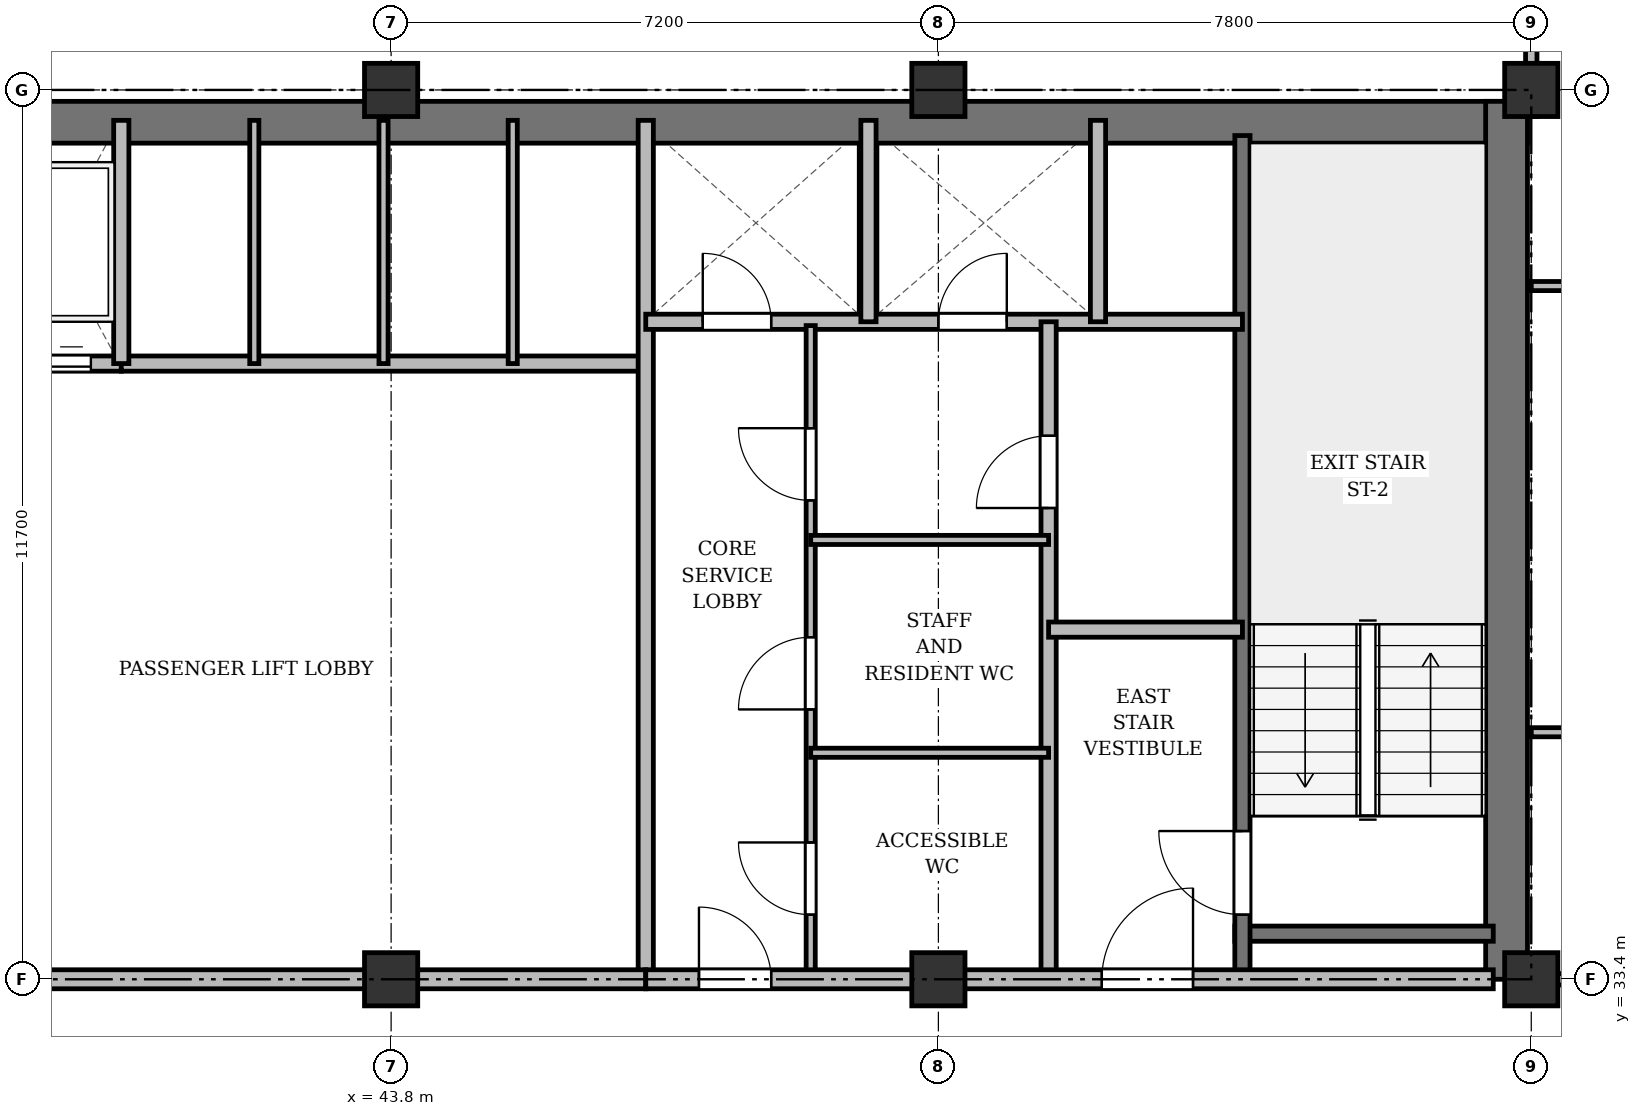
"""IFC4 building model, lengths in metres.
Left out: names, types, materials, properties, quantities, classifications, styles, units other than length and angle.
Written with IfcOpenShell. Run it as: python <this file> out.ifc"""

import sys

from ifc_helpers import new_model, si_unit, direction, frame, frame_2d, origin, origin_2d, place, context, subcontext, project, spatial, rectangle, extrude, source, transform, mapped, element, fill, save


model = new_model("IFC4")
c1 = context("Model", 3, precision=1e-05, world=origin(), true_north=direction((0.0, 1.0)))
c2 = subcontext(c1, "Body", "Model", "MODEL_VIEW")
j1 = project(units=[si_unit("LENGTHUNIT", "METRE"), si_unit("PLANEANGLEUNIT", "RADIAN")], contexts=[c1])
p1 = place(None, origin())
s1 = spatial("IfcSite", under=j1, at=p1, CompositionType="ELEMENT")
p2 = place(p1, origin())
s2 = spatial("IfcBuilding", under=s1, at=p2, CompositionType="ELEMENT")
p3 = place(p2, frame((0.0, 0.0, 153.7)))
s3 = spatial("IfcBuildingStorey", under=s2, at=p3, CompositionType="ELEMENT", Elevation=153.7)
m1 = source(origin(), c2, "Body", "SweptSolid", [
    extrude(rectangle(XDim=0.7, YDim=0.7, at=origin_2d()), origin(), (0.0, 0.0, 1.0), 3.6),
])
for number, where, z_axis, x_axis in (
    (1, (43.8, 33.4, 0.0), (0.0, 0.0, 1.0), (1.0, 0.0, 0.0)),
    (2, (43.8, 45.1, 0.0), (0.0, 0.0, 1.0), (1.0, 0.0, 0.0)),
    (3, (51.0, 33.4, 0.0), (0.0, 0.0, 1.0), (1.0, 0.0, 0.0)),
    (4, (51.0, 45.1, 0.0), (0.0, 0.0, 1.0), (1.0, 0.0, 0.0)),
    (5, (58.8, 33.4, 0.0), (0.0, 0.0, 1.0), (1.0, 0.0, 0.0)),
    (6, (58.8, 45.1, 0.0), (0.0, 0.0, 1.0), (1.0, 0.0, 0.0)),
):
    element("IfcColumn", number, at=place(p3, frame(where, z_axis=z_axis, x_axis=x_axis)), inside=s3, PredefinedType="COLUMN", context=c2, shape_type="MappedRepresentation", body=[
        mapped(m1, transform((0.0, 0.0, 0.0), x_axis=(1.0, 0.0, 0.0), y_axis=(0.0, 1.0, 0.0), z_axis=(0.0, 0.0, 1.0), scale=1.0)),
    ])
p4 = place(p3, frame((15.65, 44.675, 0.0), z_axis=(0.0, 0.0, 1.0), x_axis=(1.0, 0.0, 0.0)))
e7 = element("IfcWall", 7, at=p4, inside=s3, PredefinedType="SHEAR", context=c2, shape_type="SweptSolid", body=[
    extrude(rectangle(XDim=43.1, YDim=0.55, at=frame_2d((21.55, 0.0))), origin(), (0.0, 0.0, 1.0), 3.35),
])
p5 = place(p3, frame((58.475, 33.4, 0.0), z_axis=(0.0, 0.0, 1.0), x_axis=(0.0, 1.0, 0.0)))
e8 = element("IfcWall", 8, at=p5, inside=s3, PredefinedType="SHEAR", context=c2, shape_type="SweptSolid", body=[
    extrude(rectangle(XDim=11.55, YDim=0.55, at=frame_2d((5.775, 0.0))), origin(), (0.0, 0.0, 1.0), 3.35),
])
p6 = place(p3, frame((54.9, 34.0, 0.0), z_axis=(0.0, 0.0, 1.0), x_axis=(1.0, 0.0, 0.0)))
e9 = element("IfcWall", 9, at=p6, inside=s3, PredefinedType="SHEAR", context=c2, shape_type="SweptSolid", body=[
    extrude(rectangle(XDim=3.4, YDim=0.2, at=frame_2d((1.7, 0.0))), origin(), (0.0, 0.0, 1.0), 3.35),
])
p7 = place(p3, frame((55.0, 33.4, 0.0), z_axis=(0.0, 0.0, 1.0), x_axis=(0.0, 1.0, 0.0)))
e10 = element("IfcWall", 10, at=p7, inside=s3, PredefinedType="SHEAR", context=c2, shape_type="SweptSolid", body=[
    extrude(rectangle(XDim=11.1, YDim=0.2, at=frame_2d((5.55, 0.0))), origin(), (0.0, 0.0, 1.0), 3.35),
])
p8 = place(p7, frame((0.85, 0.0, 0.0)))
e11 = element("IfcOpeningElement", 11, at=p8, cuts=e10, PredefinedType="OPENING", context=c2, shape_type="SweptSolid", body=[
    extrude(rectangle(XDim=1.1, YDim=2.15, at=frame_2d((0.55, 1.075))), frame((0.0, 0.11, 0.0), z_axis=(0.0, -1.0, 0.0), x_axis=(1.0, 0.0, 0.0)), (0.0, 0.0, 1.0), 0.22),
])
p9 = place(p3, frame((33.35, 41.5, 0.0), z_axis=(0.0, 0.0, 1.0), x_axis=(1.0, 0.0, 0.0)))
e12 = element("IfcWall", 12, at=p9, inside=s3, PredefinedType="SOLIDWALL", context=c2, shape_type="SweptSolid", body=[
    extrude(rectangle(XDim=6.9, YDim=0.2, at=frame_2d((3.45, 0.0))), origin(), (0.0, 0.0, 1.0), 3.35),
])
p10 = place(p9, frame((0.35, 0.0, 0.0)))
e13 = element("IfcOpeningElement", 13, at=p10, cuts=e12, PredefinedType="OPENING", context=c2, shape_type="SweptSolid", body=[
    extrude(rectangle(XDim=1.05, YDim=2.15, at=frame_2d((0.525, 1.075))), frame((0.0, 0.11, 0.0), z_axis=(0.0, -1.0, 0.0), x_axis=(1.0, 0.0, 0.0)), (0.0, 0.0, 1.0), 0.22),
])
p11 = place(p9, frame((2.05, 0.0, 0.0)))
e14 = element("IfcOpeningElement", 14, at=p11, cuts=e12, PredefinedType="OPENING", context=c2, shape_type="SweptSolid", body=[
    extrude(rectangle(XDim=1.05, YDim=2.15, at=frame_2d((0.525, 1.075))), frame((0.0, 0.11, 0.0), z_axis=(0.0, -1.0, 0.0), x_axis=(1.0, 0.0, 0.0)), (0.0, 0.0, 1.0), 0.22),
])
p12 = place(p9, frame((3.75, 0.0, 0.0)))
e15 = element("IfcOpeningElement", 15, at=p12, cuts=e12, PredefinedType="OPENING", context=c2, shape_type="SweptSolid", body=[
    extrude(rectangle(XDim=1.05, YDim=2.15, at=frame_2d((0.525, 1.075))), frame((0.0, 0.11, 0.0), z_axis=(0.0, -1.0, 0.0), x_axis=(1.0, 0.0, 0.0)), (0.0, 0.0, 1.0), 0.22),
])
p13 = place(p9, frame((5.45, 0.0, 0.0)))
e16 = element("IfcOpeningElement", 16, at=p13, cuts=e12, PredefinedType="OPENING", context=c2, shape_type="SweptSolid", body=[
    extrude(rectangle(XDim=1.05, YDim=2.15, at=frame_2d((0.525, 1.075))), frame((0.0, 0.11, 0.0), z_axis=(0.0, -1.0, 0.0), x_axis=(1.0, 0.0, 0.0)), (0.0, 0.0, 1.0), 0.22),
])
p14 = place(p3, frame((40.25, 41.5, 0.0), z_axis=(0.0, 0.0, 1.0), x_axis=(1.0, 0.0, 0.0)))
e17 = element("IfcWall", 17, at=p14, inside=s3, PredefinedType="SOLIDWALL", context=c2, shape_type="SweptSolid", body=[
    extrude(rectangle(XDim=6.9, YDim=0.2, at=frame_2d((3.45, 0.0))), origin(), (0.0, 0.0, 1.0), 2.85),
])
p15 = place(p3, frame((40.25, 41.5, 0.0), z_axis=(0.0, 0.0, 1.0), x_axis=(0.0, 1.0, 0.0)))
e18 = element("IfcWall", 18, at=p15, inside=s3, PredefinedType="SOLIDWALL", context=c2, shape_type="SweptSolid", body=[
    extrude(rectangle(XDim=3.2, YDim=0.2, at=frame_2d((1.6, 0.0))), origin(), (0.0, 0.0, 1.0), 3.35),
])
p16 = place(p3, frame((42.0, 41.5, 0.0), z_axis=(0.0, 0.0, 1.0), x_axis=(0.0, 1.0, 0.0)))
e19 = element("IfcWall", 19, at=p16, inside=s3, PredefinedType="PARTITIONING", context=c2, shape_type="SweptSolid", body=[
    extrude(rectangle(XDim=3.2, YDim=0.12, at=frame_2d((1.6, 0.0))), origin(), (0.0, 0.0, 1.0), 3.35),
])
p17 = place(p3, frame((43.7, 41.5, 0.0), z_axis=(0.0, 0.0, 1.0), x_axis=(0.0, 1.0, 0.0)))
e20 = element("IfcWall", 20, at=p17, inside=s3, PredefinedType="PARTITIONING", context=c2, shape_type="SweptSolid", body=[
    extrude(rectangle(XDim=3.2, YDim=0.12, at=frame_2d((1.6, 0.0))), origin(), (0.0, 0.0, 1.0), 2.85),
])
p18 = place(p3, frame((45.4, 41.5, 0.0), z_axis=(0.0, 0.0, 1.0), x_axis=(0.0, 1.0, 0.0)))
e21 = element("IfcWall", 21, at=p18, inside=s3, PredefinedType="PARTITIONING", context=c2, shape_type="SweptSolid", body=[
    extrude(rectangle(XDim=3.2, YDim=0.12, at=frame_2d((1.6, 0.0))), origin(), (0.0, 0.0, 1.0), 3.35),
])
p19 = place(p3, frame((47.15, 33.4, 0.0), z_axis=(0.0, 0.0, 1.0), x_axis=(0.0, 1.0, 0.0)))
e22 = element("IfcWall", 22, at=p19, inside=s3, PredefinedType="SOLIDWALL", context=c2, shape_type="SweptSolid", body=[
    extrude(rectangle(XDim=11.3, YDim=0.2, at=frame_2d((5.65, 0.0))), origin(), (0.0, 0.0, 1.0), 2.75),
])
p20 = place(p3, frame((33.3, 33.4, 0.0), z_axis=(0.0, 0.0, 1.0), x_axis=(1.0, 0.0, 0.0)))
e23 = element("IfcWall", 23, at=p20, inside=s3, PredefinedType="PARTITIONING", context=c2, shape_type="SweptSolid", body=[
    extrude(rectangle(XDim=13.85, YDim=0.25, at=frame_2d((6.925, 0.0))), origin(), (0.0, 0.0, 1.0), 2.75),
])
p21 = place(p20, frame((4.2, 0.0, 0.0)))
e24 = element("IfcOpeningElement", 24, at=p21, cuts=e23, PredefinedType="OPENING", context=c2, shape_type="SweptSolid", body=[
    extrude(rectangle(XDim=1.6, YDim=2.2, at=frame_2d((0.8, 1.1))), frame((0.0, 0.135, 0.0), z_axis=(0.0, -1.0, 0.0), x_axis=(1.0, 0.0, 0.0)), (0.0, 0.0, 1.0), 0.27),
])
p22 = place(p3, frame((47.15, 42.05, 0.0), z_axis=(0.0, 0.0, 1.0), x_axis=(1.0, 0.0, 0.0)))
e25 = element("IfcWall", 25, at=p22, inside=s3, PredefinedType="SOLIDWALL", context=c2, shape_type="SweptSolid", body=[
    extrude(rectangle(XDim=7.85, YDim=0.2, at=frame_2d((3.925, 0.0))), origin(), (0.0, 0.0, 1.0), 2.85),
])
p23 = place(p22, frame((0.75, 0.0, 0.0)))
e26 = element("IfcOpeningElement", 26, at=p23, cuts=e25, PredefinedType="OPENING", context=c2, shape_type="SweptSolid", body=[
    extrude(rectangle(XDim=0.9, YDim=2.1, at=frame_2d((0.45, 1.05))), frame((0.0, 0.11, 0.0), z_axis=(0.0, -1.0, 0.0), x_axis=(1.0, 0.0, 0.0)), (0.0, 0.0, 1.0), 0.22),
])
p24 = place(p22, frame((3.85, 0.0, 0.0)))
e27 = element("IfcOpeningElement", 27, at=p24, cuts=e25, PredefinedType="OPENING", context=c2, shape_type="SweptSolid", body=[
    extrude(rectangle(XDim=0.9, YDim=2.1, at=frame_2d((0.45, 1.05))), frame((0.0, 0.11, 0.0), z_axis=(0.0, -1.0, 0.0), x_axis=(1.0, 0.0, 0.0)), (0.0, 0.0, 1.0), 0.22),
])
for number, where, z_axis, x_axis in (
    (28, (50.08, 42.05, 0.0), (0.0, 0.0, 1.0), (0.0, 1.0, 0.0)),
    (29, (53.1, 42.05, 0.0), (0.0, 0.0, 1.0), (0.0, 1.0, 0.0)),
):
    element("IfcWall", number, at=place(p3, frame(where, z_axis=z_axis, x_axis=x_axis)), inside=s3, PredefinedType="SOLIDWALL", context=c2, shape_type="SweptSolid", body=[
        extrude(rectangle(XDim=2.65, YDim=0.2, at=frame_2d((1.325, 0.0))), origin(), (0.0, 0.0, 1.0), 3.35),
    ])
p25 = place(p3, frame((52.45, 33.4, 0.0), z_axis=(0.0, 0.0, 1.0), x_axis=(0.0, 1.0, 0.0)))
e30 = element("IfcWall", 30, at=p25, inside=s3, PredefinedType="PARTITIONING", context=c2, shape_type="SweptSolid", body=[
    extrude(rectangle(XDim=8.65, YDim=0.2, at=frame_2d((4.325, 0.0))), origin(), (0.0, 0.0, 1.0), 2.75),
])
p26 = place(p25, frame((6.2, 0.0, 0.0)))
e31 = element("IfcOpeningElement", 31, at=p26, cuts=e30, PredefinedType="OPENING", context=c2, shape_type="SweptSolid", body=[
    extrude(rectangle(XDim=0.95, YDim=2.15, at=frame_2d((0.475, 1.075))), frame((0.0, 0.11, 0.0), z_axis=(0.0, -1.0, 0.0), x_axis=(1.0, 0.0, 0.0)), (0.0, 0.0, 1.0), 0.22),
])
p27 = place(p3, frame((52.45, 38.0, 0.0), z_axis=(0.0, 0.0, 1.0), x_axis=(1.0, 0.0, 0.0)))
e32 = element("IfcWall", 32, at=p27, inside=s3, PredefinedType="PARTITIONING", context=c2, shape_type="SweptSolid", body=[
    extrude(rectangle(XDim=2.55, YDim=0.2, at=frame_2d((1.275, 0.0))), origin(), (0.0, 0.0, 1.0), 3.35),
])
p28 = place(p3, frame((49.32, 33.4, 0.0), z_axis=(0.0, 0.0, 1.0), x_axis=(0.0, 1.0, 0.0)))
e33 = element("IfcWall", 33, at=p28, inside=s3, PredefinedType="PARTITIONING", context=c2, shape_type="SweptSolid", body=[
    extrude(rectangle(XDim=8.6, YDim=0.12, at=frame_2d((4.3, 0.0))), origin(), (0.0, 0.0, 1.0), 2.75),
])
p29 = place(p28, frame((0.85, 0.0, 0.0)))
e34 = element("IfcOpeningElement", 34, at=p29, cuts=e33, PredefinedType="OPENING", context=c2, shape_type="SweptSolid", body=[
    extrude(rectangle(XDim=0.95, YDim=2.15, at=frame_2d((0.475, 1.075))), frame((0.0, 0.07, 0.0), z_axis=(0.0, -1.0, 0.0), x_axis=(1.0, 0.0, 0.0)), (0.0, 0.0, 1.0), 0.14),
])
p30 = place(p28, frame((3.55, 0.0, 0.0)))
e35 = element("IfcOpeningElement", 35, at=p30, cuts=e33, PredefinedType="OPENING", context=c2, shape_type="SweptSolid", body=[
    extrude(rectangle(XDim=0.95, YDim=2.15, at=frame_2d((0.475, 1.075))), frame((0.0, 0.07, 0.0), z_axis=(0.0, -1.0, 0.0), x_axis=(1.0, 0.0, 0.0)), (0.0, 0.0, 1.0), 0.14),
])
p31 = place(p28, frame((6.3, 0.0, 0.0)))
e36 = element("IfcOpeningElement", 36, at=p31, cuts=e33, PredefinedType="OPENING", context=c2, shape_type="SweptSolid", body=[
    extrude(rectangle(XDim=0.95, YDim=2.15, at=frame_2d((0.475, 1.075))), frame((0.0, 0.07, 0.0), z_axis=(0.0, -1.0, 0.0), x_axis=(1.0, 0.0, 0.0)), (0.0, 0.0, 1.0), 0.14),
])
for number, where, z_axis, x_axis in (
    (37, (49.32, 36.38, 0.0), (0.0, 0.0, 1.0), (1.0, 0.0, 0.0)),
    (38, (49.32, 39.18, 0.0), (0.0, 0.0, 1.0), (1.0, 0.0, 0.0)),
):
    element("IfcWall", number, at=place(p3, frame(where, z_axis=z_axis, x_axis=x_axis)), inside=s3, PredefinedType="PARTITIONING", context=c2, shape_type="SweptSolid", body=[
        extrude(rectangle(XDim=3.13, YDim=0.12, at=frame_2d((1.565, 0.0))), origin(), (0.0, 0.0, 1.0), 2.85),
    ])
p32 = place(p3, frame((47.15, 33.4, 0.0), z_axis=(0.0, 0.0, 1.0), x_axis=(1.0, 0.0, 0.0)))
e39 = element("IfcWall", 39, at=p32, inside=s3, PredefinedType="PARTITIONING", context=c2, shape_type="SweptSolid", body=[
    extrude(rectangle(XDim=11.15, YDim=0.25, at=frame_2d((5.575, 0.0))), origin(), (0.0, 0.0, 1.0), 2.75),
])
p33 = place(p32, frame((0.7, 0.0, 0.0)))
e40 = element("IfcOpeningElement", 40, at=p33, cuts=e39, PredefinedType="OPENING", context=c2, shape_type="SweptSolid", body=[
    extrude(rectangle(XDim=0.95, YDim=2.15, at=frame_2d((0.475, 1.075))), frame((0.0, 0.135, 0.0), z_axis=(0.0, -1.0, 0.0), x_axis=(1.0, 0.0, 0.0)), (0.0, 0.0, 1.0), 0.27),
])
p34 = place(p32, frame((6.0, 0.0, 0.0)))
e41 = element("IfcOpeningElement", 41, at=p34, cuts=e39, PredefinedType="OPENING", context=c2, shape_type="SweptSolid", body=[
    extrude(rectangle(XDim=1.2, YDim=2.15, at=frame_2d((0.6, 1.075))), frame((0.0, 0.135, 0.0), z_axis=(0.0, -1.0, 0.0), x_axis=(1.0, 0.0, 0.0)), (0.0, 0.0, 1.0), 0.27),
])
p35 = place(p3, frame((58.8, 36.65, 0.0), z_axis=(0.0, 0.0, 1.0), x_axis=(1.0, 0.0, 0.0)))
e42 = element("IfcWall", 42, at=p35, inside=s3, PredefinedType="PARTITIONING", context=c2, shape_type="SweptSolid", body=[
    extrude(rectangle(XDim=2.45, YDim=0.12, at=frame_2d((1.225, 0.0))), origin(), (0.0, 0.0, 1.0), 2.85),
])
p36 = place(p3, frame((58.8, 42.52, 0.0), z_axis=(0.0, 0.0, 1.0), x_axis=(1.0, 0.0, 0.0)))
e43 = element("IfcWall", 43, at=p36, inside=s3, PredefinedType="PARTITIONING", context=c2, shape_type="SweptSolid", body=[
    extrude(rectangle(XDim=3.775, YDim=0.12, at=frame_2d((1.887, 0.0))), origin(), (0.0, 0.0, 1.0), 2.85),
])
p37 = place(p36, frame((1.506, 0.0, 0.0)))
e44 = element("IfcOpeningElement", 44, at=p37, cuts=e43, PredefinedType="OPENING", context=c2, shape_type="SweptSolid", body=[
    extrude(rectangle(XDim=0.95, YDim=2.15, at=frame_2d((0.475, 1.075))), frame((0.0, 0.07, 0.0), z_axis=(0.0, -1.0, 0.0), x_axis=(1.0, 0.0, 0.0)), (0.0, 0.0, 1.0), 0.14),
])
p38 = place(p3, frame((58.8, 33.4, 0.0), z_axis=(0.0, 0.0, 1.0), x_axis=(1.0, 0.0, 0.0)))
e45 = element("IfcWall", 45, at=p38, inside=s3, PredefinedType="PARTITIONING", context=c2, shape_type="SweptSolid", body=[
    extrude(rectangle(XDim=7.55, YDim=0.15, at=frame_2d((3.775, 0.0))), origin(), (0.0, 0.0, 1.0), 2.75),
])
p39 = place(p38, frame((4.375, 0.0, 0.0)))
e46 = element("IfcOpeningElement", 46, at=p39, cuts=e45, PredefinedType="OPENING", context=c2, shape_type="SweptSolid", body=[
    extrude(rectangle(XDim=0.95, YDim=2.15, at=frame_2d((0.475, 1.075))), frame((0.0, 0.085, 0.0), z_axis=(0.0, -1.0, 0.0), x_axis=(1.0, 0.0, 0.0)), (0.0, 0.0, 1.0), 0.17),
])
p40 = place(p3, frame((58.8, 44.75, 0.0), z_axis=(0.0, 0.0, 1.0), x_axis=(0.0, 1.0, 0.0)))
e47 = element("IfcWall", 47, at=p40, inside=s3, PredefinedType="PARTITIONING", context=c2, shape_type="SweptSolid", body=[
    extrude(rectangle(XDim=3.61, YDim=0.15, at=frame_2d((1.805, 0.0))), origin(), (0.0, 0.0, 1.0), 2.85),
])
p41 = place(p40, frame((1.1, 0.0, 0.0)))
e48 = element("IfcOpeningElement", 48, at=p41, cuts=e47, PredefinedType="OPENING", context=c2, shape_type="SweptSolid", body=[
    extrude(rectangle(XDim=0.95, YDim=2.15, at=frame_2d((0.475, 1.075))), frame((0.0, 0.085, 0.0), z_axis=(0.0, -1.0, 0.0), x_axis=(1.0, 0.0, 0.0)), (0.0, 0.0, 1.0), 0.17),
])
m2 = source(origin(), c2, "Body", "SweptSolid", [
    extrude(rectangle(XDim=1.1, YDim=2.15, at=frame_2d((0.55, 1.075))), frame((0.0, 0.025, 0.0), z_axis=(0.0, -1.0, 0.0), x_axis=(1.0, 0.0, 0.0)), (0.0, 0.0, 1.0), 0.05),
])
p42 = place(p8, origin())
e49 = element("IfcDoor", 49, at=p42, inside=s3, OperationType="SINGLE_SWING_RIGHT", PredefinedType="DOOR", context=c2, shape_type="MappedRepresentation", body=[
    mapped(m2, transform((0.0, 0.0, 0.0), x_axis=(1.0, 0.0, 0.0), y_axis=(0.0, 1.0, 0.0), z_axis=(0.0, 0.0, 1.0), scale=1.0)),
])
fill(e11, e49)
m3 = source(origin(), c2, "Body", "SweptSolid", [
    extrude(rectangle(XDim=1.05, YDim=2.15, at=frame_2d((0.525, 1.075))), frame((0.0, 0.025, 0.0), z_axis=(0.0, -1.0, 0.0), x_axis=(1.0, 0.0, 0.0)), (0.0, 0.0, 1.0), 0.05),
])
p43 = place(p13, origin())
e50 = element("IfcDoor", 50, at=p43, inside=s3, OperationType="DOUBLE_DOOR_SLIDING", PredefinedType="DOOR", context=c2, shape_type="MappedRepresentation", body=[
    mapped(m3, transform((0.0, 0.0, 0.0), x_axis=(1.0, 0.0, 0.0), y_axis=(0.0, 1.0, 0.0), z_axis=(0.0, 0.0, 1.0), scale=1.0)),
])
fill(e16, e50)
m4 = source(origin(), c2, "Body", "SweptSolid", [
    extrude(rectangle(XDim=0.9, YDim=2.1, at=frame_2d((0.45, 1.05))), frame((0.0, 0.025, 0.0), z_axis=(0.0, -1.0, 0.0), x_axis=(1.0, 0.0, 0.0)), (0.0, 0.0, 1.0), 0.05),
])
p44 = place(p23, origin())
e51 = element("IfcDoor", 51, at=p44, inside=s3, OperationType="SINGLE_SWING_LEFT", PredefinedType="DOOR", context=c2, shape_type="MappedRepresentation", body=[
    mapped(m4, transform((0.0, 0.0, 0.0), x_axis=(1.0, 0.0, 0.0), y_axis=(0.0, 1.0, 0.0), z_axis=(0.0, 0.0, 1.0), scale=1.0)),
])
fill(e26, e51)
p45 = place(p24, origin())
e52 = element("IfcDoor", 52, at=p45, inside=s3, OperationType="SINGLE_SWING_RIGHT", PredefinedType="DOOR", context=c2, shape_type="MappedRepresentation", body=[
    mapped(m4, transform((0.0, 0.0, 0.0), x_axis=(1.0, 0.0, 0.0), y_axis=(0.0, 1.0, 0.0), z_axis=(0.0, 0.0, 1.0), scale=1.0)),
])
fill(e27, e52)
m5 = source(origin(), c2, "Body", "SweptSolid", [
    extrude(rectangle(XDim=0.95, YDim=2.15, at=frame_2d((0.475, 1.075))), frame((0.0, 0.025, 0.0), z_axis=(0.0, -1.0, 0.0), x_axis=(1.0, 0.0, 0.0)), (0.0, 0.0, 1.0), 0.05),
])
p46 = place(p26, origin())
e53 = element("IfcDoor", 53, at=p46, inside=s3, OperationType="SINGLE_SWING_LEFT", PredefinedType="DOOR", context=c2, shape_type="MappedRepresentation", body=[
    mapped(m5, transform((0.0, 0.0, 0.0), x_axis=(1.0, 0.0, 0.0), y_axis=(0.0, 1.0, 0.0), z_axis=(0.0, 0.0, 1.0), scale=1.0)),
])
fill(e31, e53)
p47 = place(p29, origin())
e54 = element("IfcDoor", 54, at=p47, inside=s3, OperationType="SINGLE_SWING_RIGHT", PredefinedType="DOOR", context=c2, shape_type="MappedRepresentation", body=[
    mapped(m5, transform((0.0, 0.0, 0.0), x_axis=(1.0, 0.0, 0.0), y_axis=(0.0, 1.0, 0.0), z_axis=(0.0, 0.0, 1.0), scale=1.0)),
])
fill(e34, e54)
p48 = place(p30, origin())
e55 = element("IfcDoor", 55, at=p48, inside=s3, OperationType="SINGLE_SWING_LEFT", PredefinedType="DOOR", context=c2, shape_type="MappedRepresentation", body=[
    mapped(m5, transform((0.0, 0.0, 0.0), x_axis=(1.0, 0.0, 0.0), y_axis=(0.0, 1.0, 0.0), z_axis=(0.0, 0.0, 1.0), scale=1.0)),
])
fill(e35, e55)
p49 = place(p31, origin())
e56 = element("IfcDoor", 56, at=p49, inside=s3, OperationType="SINGLE_SWING_RIGHT", PredefinedType="DOOR", context=c2, shape_type="MappedRepresentation", body=[
    mapped(m5, transform((0.0, 0.0, 0.0), x_axis=(1.0, 0.0, 0.0), y_axis=(0.0, 1.0, 0.0), z_axis=(0.0, 0.0, 1.0), scale=1.0)),
])
fill(e36, e56)
p50 = place(p33, origin())
e57 = element("IfcDoor", 57, at=p50, inside=s3, OperationType="SINGLE_SWING_LEFT", PredefinedType="DOOR", context=c2, shape_type="MappedRepresentation", body=[
    mapped(m5, transform((0.0, 0.0, 0.0), x_axis=(1.0, 0.0, 0.0), y_axis=(0.0, 1.0, 0.0), z_axis=(0.0, 0.0, 1.0), scale=1.0)),
])
fill(e40, e57)
m6 = source(origin(), c2, "Body", "SweptSolid", [
    extrude(rectangle(XDim=1.2, YDim=2.15, at=frame_2d((0.6, 1.075))), frame((0.0, 0.025, 0.0), z_axis=(0.0, -1.0, 0.0), x_axis=(1.0, 0.0, 0.0)), (0.0, 0.0, 1.0), 0.05),
])
p51 = place(p34, origin())
e58 = element("IfcDoor", 58, at=p51, inside=s3, OperationType="SINGLE_SWING_RIGHT", PredefinedType="DOOR", context=c2, shape_type="MappedRepresentation", body=[
    mapped(m6, transform((0.0, 0.0, 0.0), x_axis=(1.0, 0.0, 0.0), y_axis=(0.0, 1.0, 0.0), z_axis=(0.0, 0.0, 1.0), scale=1.0)),
])
fill(e41, e58)
save(model, sys.argv[1])
